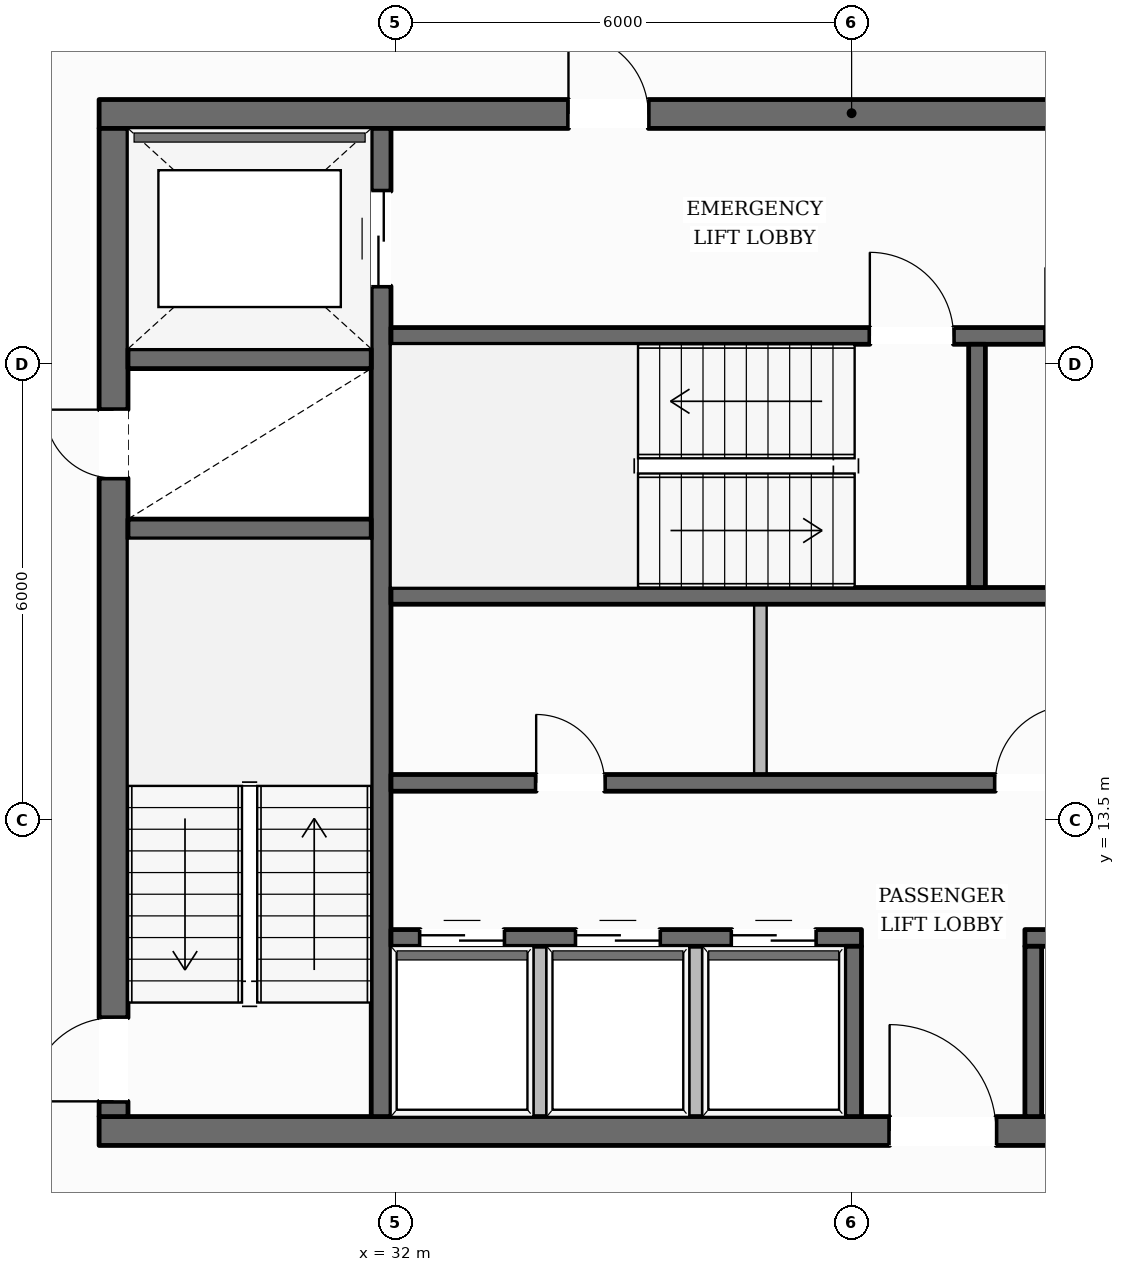
"""IFC4 building model, lengths in metres.
Left out: names, types, materials, properties, quantities, classifications, styles, units other than length and angle.
Written with IfcOpenShell. Run it as: python <this file> out.ifc"""

import sys

from ifc_helpers import new_model, si_unit, direction, frame, frame_2d, origin, place, context, subcontext, project, spatial, rectangle, extrude, element, fill, save


model = new_model("IFC4")
c1 = context("Model", 3, precision=1e-05, world=origin(), true_north=direction((0.0, 1.0)))
c2 = subcontext(c1, "Body", "Model", "MODEL_VIEW")
j1 = project(units=[si_unit("LENGTHUNIT", "METRE"), si_unit("PLANEANGLEUNIT", "RADIAN")], contexts=[c1])
p1 = place(None, origin())
s1 = spatial("IfcSite", under=j1, at=p1, CompositionType="ELEMENT")
p2 = place(p1, origin())
s2 = spatial("IfcBuilding", under=s1, at=p2, CompositionType="ELEMENT")
p3 = place(p2, frame((0.0, 0.0, 285.7)))
s3 = spatial("IfcBuildingStorey", under=s2, at=p3, CompositionType="ELEMENT", Elevation=285.7)
p4 = place(p3, frame((28.1, 9.41, 0.0), z_axis=(0.0, 0.0, 1.0), x_axis=(1.0, 0.0, 0.0)))
e1 = element("IfcWall", 1, at=p4, inside=s3, PredefinedType="SOLIDWALL", context=c2, shape_type="SweptSolid", body=[
    extrude(rectangle(XDim=19.8, YDim=0.38, at=frame_2d((9.9, 0.0))), origin(), (0.0, 0.0, 1.0), 3.61),
])
p5 = place(p4, frame((10.4, 0.0, 0.0)))
e2 = element("IfcOpeningElement", 2, at=p5, cuts=e1, PredefinedType="OPENING", context=c2, shape_type="SweptSolid", body=[
    extrude(rectangle(XDim=1.4, YDim=2.2, at=frame_2d((0.7, 1.1))), frame((0.0, 0.2, 0.0), z_axis=(0.0, -1.0, 0.0), x_axis=(1.0, 0.0, 0.0)), (0.0, 0.0, 1.0), 0.4),
])
p6 = place(p3, frame((28.1, 22.79, 0.0), z_axis=(0.0, 0.0, 1.0), x_axis=(1.0, 0.0, 0.0)))
e3 = element("IfcWall", 3, at=p6, inside=s3, PredefinedType="SOLIDWALL", context=c2, shape_type="SweptSolid", body=[
    extrude(rectangle(XDim=19.8, YDim=0.38, at=frame_2d((9.9, 0.0))), origin(), (0.0, 0.0, 1.0), 3.61),
])
p7 = place(p6, frame((6.175, 0.0, 0.0)))
e4 = element("IfcOpeningElement", 4, at=p7, cuts=e3, PredefinedType="OPENING", context=c2, shape_type="SweptSolid", body=[
    extrude(rectangle(XDim=1.05, YDim=2.15, at=frame_2d((0.525, 1.075))), frame((0.0, 0.2, 0.0), z_axis=(0.0, -1.0, 0.0), x_axis=(1.0, 0.0, 0.0)), (0.0, 0.0, 1.0), 0.4),
])
p8 = place(p6, frame((12.575, 0.0, 0.0)))
e5 = element("IfcOpeningElement", 5, at=p8, cuts=e3, PredefinedType="OPENING", context=c2, shape_type="SweptSolid", body=[
    extrude(rectangle(XDim=1.05, YDim=2.15, at=frame_2d((0.525, 1.075))), frame((0.0, 0.2, 0.0), z_axis=(0.0, -1.0, 0.0), x_axis=(1.0, 0.0, 0.0)), (0.0, 0.0, 1.0), 0.4),
])
p9 = place(p3, frame((28.29, 9.6, 0.0), z_axis=(0.0, 0.0, 1.0), x_axis=(0.0, 1.0, 0.0)))
e6 = element("IfcWall", 6, at=p9, inside=s3, PredefinedType="SOLIDWALL", context=c2, shape_type="SweptSolid", body=[
    extrude(rectangle(XDim=13.0, YDim=0.38, at=frame_2d((6.5, 0.0))), origin(), (0.0, 0.0, 1.0), 3.61),
])
p10 = place(p9, frame((0.2, 0.0, 0.0)))
e7 = element("IfcOpeningElement", 7, at=p10, cuts=e6, PredefinedType="OPENING", context=c2, shape_type="SweptSolid", body=[
    extrude(rectangle(XDim=1.1, YDim=2.15, at=frame_2d((0.55, 1.075))), frame((0.0, 0.2, 0.0), z_axis=(0.0, -1.0, 0.0), x_axis=(1.0, 0.0, 0.0)), (0.0, 0.0, 1.0), 0.4),
])
p11 = place(p9, frame((8.4, 0.0, 0.0)))
e8 = element("IfcOpeningElement", 8, at=p11, cuts=e6, PredefinedType="OPENING", context=c2, shape_type="SweptSolid", body=[
    extrude(rectangle(XDim=0.9, YDim=2.1, at=frame_2d((0.45, 1.05))), frame((0.0, 0.2, 0.0), z_axis=(0.0, -1.0, 0.0), x_axis=(1.0, 0.0, 0.0)), (0.0, 0.0, 1.0), 0.4),
])
p12 = place(p3, frame((31.81, 9.6, 0.0), z_axis=(0.0, 0.0, 1.0), x_axis=(0.0, 1.0, 0.0)))
e9 = element("IfcWall", 9, at=p12, inside=s3, PredefinedType="SHEAR", context=c2, shape_type="SweptSolid", body=[
    extrude(rectangle(XDim=13.0, YDim=0.26, at=frame_2d((6.5, 0.0))), origin(), (0.0, 0.0, 1.0), 3.61),
])
p13 = place(p12, frame((10.925, 0.0, 0.0)))
e10 = element("IfcOpeningElement", 10, at=p13, cuts=e9, PredefinedType="OPENING", context=c2, shape_type="SweptSolid", body=[
    extrude(rectangle(XDim=1.25, YDim=2.25, at=frame_2d((0.625, 1.125))), frame((0.0, 0.14, 0.0), z_axis=(0.0, -1.0, 0.0), x_axis=(1.0, 0.0, 0.0)), (0.0, 0.0, 1.0), 0.28),
])
for number, where, z_axis, x_axis in (
    (11, (28.48, 17.33, 0.0), (0.0, 0.0, 1.0), (1.0, 0.0, 0.0)),
    (12, (28.48, 19.57, 0.0), (0.0, 0.0, 1.0), (1.0, 0.0, 0.0)),
):
    element("IfcWall", number, at=place(p3, frame(where, z_axis=z_axis, x_axis=x_axis)), inside=s3, PredefinedType="SHEAR", context=c2, shape_type="SweptSolid", body=[
        extrude(rectangle(XDim=3.2, YDim=0.26, at=frame_2d((1.6, 0.0))), origin(), (0.0, 0.0, 1.0), 3.61),
    ])
p14 = place(p3, frame((31.94, 19.87, 0.0), z_axis=(0.0, 0.0, 1.0), x_axis=(1.0, 0.0, 0.0)))
e13 = element("IfcWall", 13, at=p14, inside=s3, PredefinedType="SOLIDWALL", context=c2, shape_type="SweptSolid", body=[
    extrude(rectangle(XDim=12.12, YDim=0.22, at=frame_2d((6.06, 0.0))), origin(), (0.0, 0.0, 1.0), 3.61),
])
p15 = place(p14, frame((6.3, 0.0, 0.0)))
e14 = element("IfcOpeningElement", 14, at=p15, cuts=e13, PredefinedType="OPENING", context=c2, shape_type="SweptSolid", body=[
    extrude(rectangle(XDim=1.1, YDim=2.15, at=frame_2d((0.55, 1.075))), frame((0.0, 0.12, 0.0), z_axis=(0.0, -1.0, 0.0), x_axis=(1.0, 0.0, 0.0)), (0.0, 0.0, 1.0), 0.24),
])
p16 = place(p14, frame((8.61, 0.0, 0.0)))
e15 = element("IfcOpeningElement", 15, at=p16, cuts=e13, PredefinedType="OPENING", context=c2, shape_type="SweptSolid", body=[
    extrude(rectangle(XDim=0.9, YDim=2.1, at=frame_2d((0.45, 1.05))), frame((0.0, 0.12, 0.0), z_axis=(0.0, -1.0, 0.0), x_axis=(1.0, 0.0, 0.0)), (0.0, 0.0, 1.0), 0.24),
])
p17 = place(p14, frame((10.85, 0.0, 0.0)))
e16 = element("IfcOpeningElement", 16, at=p17, cuts=e13, PredefinedType="OPENING", context=c2, shape_type="SweptSolid", body=[
    extrude(rectangle(XDim=0.9, YDim=2.1, at=frame_2d((0.45, 1.05))), frame((0.0, 0.12, 0.0), z_axis=(0.0, -1.0, 0.0), x_axis=(1.0, 0.0, 0.0)), (0.0, 0.0, 1.0), 0.24),
])
p18 = place(p3, frame((31.94, 16.45, 0.0), z_axis=(0.0, 0.0, 1.0), x_axis=(1.0, 0.0, 0.0)))
e17 = element("IfcWall", 17, at=p18, inside=s3, PredefinedType="SOLIDWALL", context=c2, shape_type="SweptSolid", body=[
    extrude(rectangle(XDim=12.12, YDim=0.22, at=frame_2d((6.06, 0.0))), origin(), (0.0, 0.0, 1.0), 3.61),
])
p19 = place(p3, frame((39.65, 16.56, 0.0), z_axis=(0.0, 0.0, 1.0), x_axis=(0.0, 1.0, 0.0)))
e18 = element("IfcWall", 18, at=p19, inside=s3, PredefinedType="SOLIDWALL", context=c2, shape_type="SweptSolid", body=[
    extrude(rectangle(XDim=3.2, YDim=0.22, at=frame_2d((1.6, 0.0))), origin(), (0.0, 0.0, 1.0), 3.61),
])
p20 = place(p3, frame((31.94, 13.99, 0.0), z_axis=(0.0, 0.0, 1.0), x_axis=(1.0, 0.0, 0.0)))
e19 = element("IfcWall", 19, at=p20, inside=s3, PredefinedType="SOLIDWALL", context=c2, shape_type="SweptSolid", body=[
    extrude(rectangle(XDim=12.12, YDim=0.22, at=frame_2d((6.06, 0.0))), origin(), (0.0, 0.0, 1.0), 3.61),
])
p21 = place(p20, frame((1.91, 0.0, 0.0)))
e20 = element("IfcOpeningElement", 20, at=p21, cuts=e19, PredefinedType="OPENING", context=c2, shape_type="SweptSolid", body=[
    extrude(rectangle(XDim=0.9, YDim=2.1, at=frame_2d((0.45, 1.05))), frame((0.0, 0.12, 0.0), z_axis=(0.0, -1.0, 0.0), x_axis=(1.0, 0.0, 0.0)), (0.0, 0.0, 1.0), 0.24),
])
p22 = place(p20, frame((7.95, 0.0, 0.0)))
e21 = element("IfcOpeningElement", 21, at=p22, cuts=e19, PredefinedType="OPENING", context=c2, shape_type="SweptSolid", body=[
    extrude(rectangle(XDim=1.02, YDim=2.15, at=frame_2d((0.51, 1.075))), frame((0.0, 0.12, 0.0), z_axis=(0.0, -1.0, 0.0), x_axis=(1.0, 0.0, 0.0)), (0.0, 0.0, 1.0), 0.24),
])
p23 = place(p3, frame((31.94, 11.95, 0.0), z_axis=(0.0, 0.0, 1.0), x_axis=(1.0, 0.0, 0.0)))
e22 = element("IfcWall", 22, at=p23, inside=s3, PredefinedType="SOLIDWALL", context=c2, shape_type="SweptSolid", body=[
    extrude(rectangle(XDim=6.19, YDim=0.22, at=frame_2d((3.095, 0.0))), origin(), (0.0, 0.0, 1.0), 3.61),
])
p24 = place(p23, frame((0.385, 0.0, 0.0)))
e23 = element("IfcOpeningElement", 23, at=p24, cuts=e22, PredefinedType="OPENING", context=c2, shape_type="SweptSolid", body=[
    extrude(rectangle(XDim=1.1, YDim=2.2, at=frame_2d((0.55, 1.1))), frame((0.0, 0.12, 0.0), z_axis=(0.0, -1.0, 0.0), x_axis=(1.0, 0.0, 0.0)), (0.0, 0.0, 1.0), 0.24),
])
p25 = place(p23, frame((2.435, 0.0, 0.0)))
e24 = element("IfcOpeningElement", 24, at=p25, cuts=e22, PredefinedType="OPENING", context=c2, shape_type="SweptSolid", body=[
    extrude(rectangle(XDim=1.1, YDim=2.2, at=frame_2d((0.55, 1.1))), frame((0.0, 0.12, 0.0), z_axis=(0.0, -1.0, 0.0), x_axis=(1.0, 0.0, 0.0)), (0.0, 0.0, 1.0), 0.24),
])
p26 = place(p23, frame((4.485, 0.0, 0.0)))
e25 = element("IfcOpeningElement", 25, at=p26, cuts=e22, PredefinedType="OPENING", context=c2, shape_type="SweptSolid", body=[
    extrude(rectangle(XDim=1.1, YDim=2.2, at=frame_2d((0.55, 1.1))), frame((0.0, 0.12, 0.0), z_axis=(0.0, -1.0, 0.0), x_axis=(1.0, 0.0, 0.0)), (0.0, 0.0, 1.0), 0.24),
])
p27 = place(p3, frame((40.28, 11.95, 0.0), z_axis=(0.0, 0.0, 1.0), x_axis=(1.0, 0.0, 0.0)))
e26 = element("IfcWall", 26, at=p27, inside=s3, PredefinedType="SOLIDWALL", context=c2, shape_type="SweptSolid", body=[
    extrude(rectangle(XDim=3.78, YDim=0.22, at=frame_2d((1.89, 0.0))), origin(), (0.0, 0.0, 1.0), 3.61),
])
p28 = place(p27, frame((1.55, 0.0, 0.0)))
e27 = element("IfcOpeningElement", 27, at=p28, cuts=e26, PredefinedType="OPENING", context=c2, shape_type="SweptSolid", body=[
    extrude(rectangle(XDim=0.9, YDim=2.1, at=frame_2d((0.45, 1.05))), frame((0.0, 0.12, 0.0), z_axis=(0.0, -1.0, 0.0), x_axis=(1.0, 0.0, 0.0)), (0.0, 0.0, 1.0), 0.24),
])
for number, where, z_axis, x_axis in (
    (28, (38.02, 9.6, 0.0), (0.0, 0.0, 1.0), (0.0, 1.0, 0.0)),
    (29, (40.39, 9.6, 0.0), (0.0, 0.0, 1.0), (0.0, 1.0, 0.0)),
):
    element("IfcWall", number, at=place(p3, frame(where, z_axis=z_axis, x_axis=x_axis)), inside=s3, PredefinedType="SOLIDWALL", context=c2, shape_type="SweptSolid", body=[
        extrude(rectangle(XDim=2.24, YDim=0.22, at=frame_2d((1.12, 0.0))), origin(), (0.0, 0.0, 1.0), 3.61),
    ])
p29 = place(p3, frame((15.195, 10.019, 0.0), z_axis=(0.0, 0.0, 1.0), x_axis=(0.508088294866, 0.861304989316, 0.0)))
e30 = element("IfcWall", 30, at=p29, inside=s3, PredefinedType="STANDARD", context=c2, shape_type="SweptSolid", body=[
    extrude(rectangle(XDim=39.26, YDim=0.35, at=frame_2d((19.63, 0.0))), origin(), (0.0, 0.0, 1.0), 3.196),
])
p30 = place(p29, frame((28.845, 0.0, 0.0)))
e31 = element("IfcOpeningElement", 31, at=p30, cuts=e30, PredefinedType="OPENING", context=c2, shape_type="SweptSolid", body=[
    extrude(rectangle(XDim=1.0, YDim=2.2, at=frame_2d((0.5, 1.1))), frame((0.0, 0.185, 0.0), z_axis=(0.0, -1.0, 0.0), x_axis=(1.0, 0.0, 0.0)), (0.0, 0.0, 1.0), 0.37),
])
p31 = place(p29, frame((34.922, 0.0, 0.65)))
e32 = element("IfcOpeningElement", 32, at=p31, cuts=e30, PredefinedType="OPENING", context=c2, shape_type="SweptSolid", body=[
    extrude(rectangle(XDim=1.35, YDim=1.75, at=frame_2d((0.675, 0.875))), frame((0.0, 0.185, 0.0), z_axis=(0.0, -1.0, 0.0), x_axis=(1.0, 0.0, 0.0)), (0.0, 0.0, 1.0), 0.37),
])
p32 = place(p29, frame((22.152, 0.0, 0.65)))
e33 = element("IfcOpeningElement", 33, at=p32, cuts=e30, PredefinedType="OPENING", context=c2, shape_type="SweptSolid", body=[
    extrude(rectangle(XDim=1.35, YDim=1.75, at=frame_2d((0.675, 0.875))), frame((0.0, 0.185, 0.0), z_axis=(0.0, -1.0, 0.0), x_axis=(1.0, 0.0, 0.0)), (0.0, 0.0, 1.0), 0.37),
])
p33 = place(p29, frame((9.382, 0.0, 0.65)))
e34 = element("IfcOpeningElement", 34, at=p33, cuts=e30, PredefinedType="OPENING", context=c2, shape_type="SweptSolid", body=[
    extrude(rectangle(XDim=1.35, YDim=1.75, at=frame_2d((0.675, 0.875))), frame((0.0, 0.185, 0.0), z_axis=(0.0, -1.0, 0.0), x_axis=(1.0, 0.0, 0.0)), (0.0, 0.0, 1.0), 0.37),
])
p34 = place(p29, frame((2.997, 0.0, 0.65)))
e35 = element("IfcOpeningElement", 35, at=p34, cuts=e30, PredefinedType="OPENING", context=c2, shape_type="SweptSolid", body=[
    extrude(rectangle(XDim=1.35, YDim=1.75, at=frame_2d((0.675, 0.875))), frame((0.0, 0.185, 0.0), z_axis=(0.0, -1.0, 0.0), x_axis=(1.0, 0.0, 0.0)), (0.0, 0.0, 1.0), 0.37),
])
for number, where, z_axis, x_axis in (
    (36, (33.9, 9.49, 0.0), (0.0, 0.0, 1.0), (0.0, 1.0, 0.0)),
    (37, (35.95, 9.49, 0.0), (0.0, 0.0, 1.0), (0.0, 1.0, 0.0)),
):
    element("IfcWall", number, at=place(p3, frame(where, z_axis=z_axis, x_axis=x_axis)), inside=s3, PredefinedType="PARTITIONING", context=c2, shape_type="SweptSolid", body=[
        extrude(rectangle(XDim=2.35, YDim=0.165, at=frame_2d((1.175, 0.0))), origin(), (0.0, 0.0, 1.0), 3.61),
    ])
p35 = place(p3, frame((36.8, 14.1, 0.0), z_axis=(0.0, 0.0, 1.0), x_axis=(0.0, 1.0, 0.0)))
e38 = element("IfcWall", 38, at=p35, inside=s3, PredefinedType="PARTITIONING", context=c2, shape_type="SweptSolid", body=[
    extrude(rectangle(XDim=2.24, YDim=0.165, at=frame_2d((1.12, 0.0))), origin(), (0.0, 0.0, 1.0), 3.61),
])
p36 = place(p10, origin())
e39 = element("IfcDoor", 39, at=p36, inside=s3, OperationType="SINGLE_SWING_LEFT", PredefinedType="DOOR", context=c2, shape_type="SweptSolid", body=[
    extrude(rectangle(XDim=1.1, YDim=2.15, at=frame_2d((0.55, 1.075))), frame((0.0, 0.025, 0.0), z_axis=(0.0, -1.0, 0.0), x_axis=(1.0, 0.0, 0.0)), (0.0, 0.0, 1.0), 0.05),
])
fill(e7, e39)
p37 = place(p15, origin())
e40 = element("IfcDoor", 40, at=p37, inside=s3, OperationType="SINGLE_SWING_LEFT", PredefinedType="DOOR", context=c2, shape_type="SweptSolid", body=[
    extrude(rectangle(XDim=1.1, YDim=2.15, at=frame_2d((0.55, 1.075))), frame((0.0, 0.025, 0.0), z_axis=(0.0, -1.0, 0.0), x_axis=(1.0, 0.0, 0.0)), (0.0, 0.0, 1.0), 0.05),
])
fill(e14, e40)
p38 = place(p11, origin())
e41 = element("IfcDoor", 41, at=p38, inside=s3, OperationType="SINGLE_SWING_RIGHT", PredefinedType="DOOR", context=c2, shape_type="SweptSolid", body=[
    extrude(rectangle(XDim=0.9, YDim=2.1, at=frame_2d((0.45, 1.05))), frame((0.0, 0.025, 0.0), z_axis=(0.0, -1.0, 0.0), x_axis=(1.0, 0.0, 0.0)), (0.0, 0.0, 1.0), 0.05),
])
fill(e8, e41)
p39 = place(p7, origin())
e42 = element("IfcDoor", 42, at=p39, inside=s3, OperationType="SINGLE_SWING_LEFT", PredefinedType="DOOR", context=c2, shape_type="SweptSolid", body=[
    extrude(rectangle(XDim=1.05, YDim=2.15, at=frame_2d((0.525, 1.075))), frame((0.0, 0.025, 0.0), z_axis=(0.0, -1.0, 0.0), x_axis=(1.0, 0.0, 0.0)), (0.0, 0.0, 1.0), 0.05),
])
fill(e4, e42)
p40 = place(p13, origin())
e43 = element("IfcDoor", 43, at=p40, inside=s3, OperationType="DOUBLE_DOOR_SLIDING", PredefinedType="DOOR", context=c2, shape_type="SweptSolid", body=[
    extrude(rectangle(XDim=1.25, YDim=2.25, at=frame_2d((0.625, 1.125))), frame((0.0, 0.025, 0.0), z_axis=(0.0, -1.0, 0.0), x_axis=(1.0, 0.0, 0.0)), (0.0, 0.0, 1.0), 0.05),
])
fill(e10, e43)
p41 = place(p5, origin())
e44 = element("IfcDoor", 44, at=p41, inside=s3, OperationType="SINGLE_SWING_LEFT", PredefinedType="DOOR", context=c2, shape_type="SweptSolid", body=[
    extrude(rectangle(XDim=1.4, YDim=2.2, at=frame_2d((0.7, 1.1))), frame((0.0, 0.025, 0.0), z_axis=(0.0, -1.0, 0.0), x_axis=(1.0, 0.0, 0.0)), (0.0, 0.0, 1.0), 0.05),
])
fill(e2, e44)
p42 = place(p24, origin())
e45 = element("IfcDoor", 45, at=p42, inside=s3, OperationType="DOUBLE_DOOR_SLIDING", PredefinedType="DOOR", context=c2, shape_type="SweptSolid", body=[
    extrude(rectangle(XDim=1.1, YDim=2.2, at=frame_2d((0.55, 1.1))), frame((0.0, 0.025, 0.0), z_axis=(0.0, -1.0, 0.0), x_axis=(1.0, 0.0, 0.0)), (0.0, 0.0, 1.0), 0.05),
])
fill(e23, e45)
p43 = place(p25, origin())
e46 = element("IfcDoor", 46, at=p43, inside=s3, OperationType="DOUBLE_DOOR_SLIDING", PredefinedType="DOOR", context=c2, shape_type="SweptSolid", body=[
    extrude(rectangle(XDim=1.1, YDim=2.2, at=frame_2d((0.55, 1.1))), frame((0.0, 0.025, 0.0), z_axis=(0.0, -1.0, 0.0), x_axis=(1.0, 0.0, 0.0)), (0.0, 0.0, 1.0), 0.05),
])
fill(e24, e46)
p44 = place(p26, origin())
e47 = element("IfcDoor", 47, at=p44, inside=s3, OperationType="DOUBLE_DOOR_SLIDING", PredefinedType="DOOR", context=c2, shape_type="SweptSolid", body=[
    extrude(rectangle(XDim=1.1, YDim=2.2, at=frame_2d((0.55, 1.1))), frame((0.0, 0.025, 0.0), z_axis=(0.0, -1.0, 0.0), x_axis=(1.0, 0.0, 0.0)), (0.0, 0.0, 1.0), 0.05),
])
fill(e25, e47)
p45 = place(p21, origin())
e48 = element("IfcDoor", 48, at=p45, inside=s3, OperationType="SINGLE_SWING_LEFT", PredefinedType="DOOR", context=c2, shape_type="SweptSolid", body=[
    extrude(rectangle(XDim=0.9, YDim=2.1, at=frame_2d((0.45, 1.05))), frame((0.0, 0.025, 0.0), z_axis=(0.0, -1.0, 0.0), x_axis=(1.0, 0.0, 0.0)), (0.0, 0.0, 1.0), 0.05),
])
fill(e20, e48)
p46 = place(p22, origin())
e49 = element("IfcDoor", 49, at=p46, inside=s3, OperationType="SINGLE_SWING_RIGHT", PredefinedType="DOOR", context=c2, shape_type="SweptSolid", body=[
    extrude(rectangle(XDim=1.02, YDim=2.15, at=frame_2d((0.51, 1.075))), frame((0.0, 0.025, 0.0), z_axis=(0.0, -1.0, 0.0), x_axis=(1.0, 0.0, 0.0)), (0.0, 0.0, 1.0), 0.05),
])
fill(e21, e49)
save(model, sys.argv[1])
